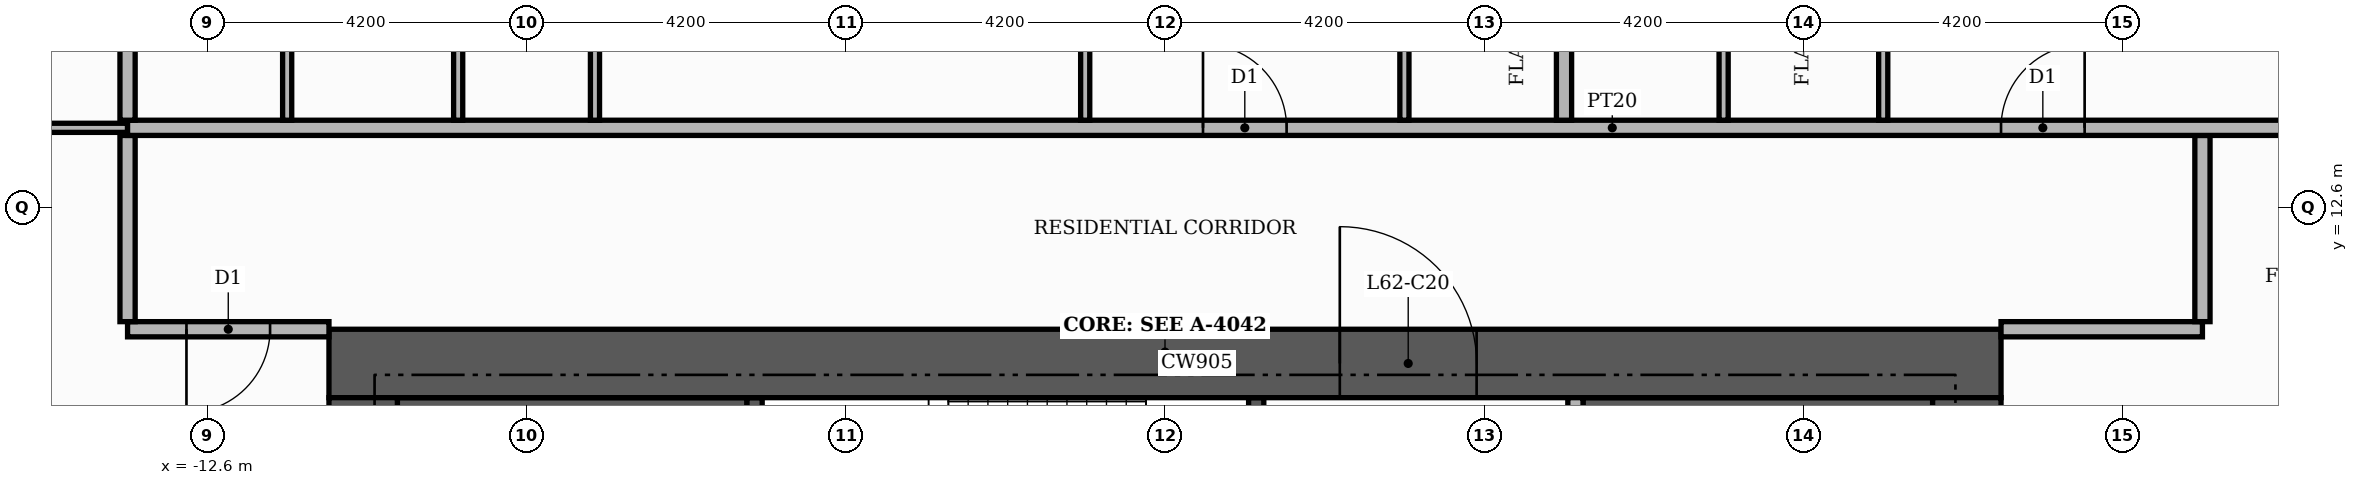
"""IFC4 building model, lengths in metres.
Left out: names, types, materials, properties, quantities, classifications, styles, units other than length and angle.
Written with IfcOpenShell. Run it as: python <this file> out.ifc"""

import sys

from ifc_helpers import new_model, si_unit, direction, frame, frame_2d, origin, place, context, subcontext, project, spatial, rectangle, extrude, element, fill, save


model = new_model("IFC4")
c1 = context("Model", 3, precision=1e-05, world=origin(), true_north=direction((0.0, 1.0)))
c2 = subcontext(c1, "Body", "Model", "MODEL_VIEW")
j1 = project(units=[si_unit("LENGTHUNIT", "METRE"), si_unit("PLANEANGLEUNIT", "RADIAN")], contexts=[c1])
p1 = place(None, origin())
s1 = spatial("IfcSite", under=j1, at=p1, CompositionType="ELEMENT")
p2 = place(p1, origin())
s2 = spatial("IfcBuilding", under=s1, at=p2, CompositionType="ELEMENT")
p3 = place(p2, frame((0.0, 0.0, 260.1)))
s3 = spatial("IfcBuildingStorey", under=s2, at=p3, CompositionType="ELEMENT", Elevation=260.1)
for number, where, z_axis, x_axis in (
    (1, (-10.1, 9.15, 0.0), (0.0, 0.0, 1.0), (1.0, 0.0, 0.0)),
    (2, (5.5, 9.15, 0.0), (0.0, 0.0, 1.0), (1.0, 0.0, 0.0)),
):
    element("IfcWall", number, at=place(p3, frame(where, z_axis=z_axis, x_axis=x_axis)), inside=s3, PredefinedType="SHEAR", context=c2, shape_type="SweptSolid", body=[
        extrude(rectangle(XDim=4.6, YDim=1.9, at=frame_2d((2.3, 0.0))), origin(), (0.0, 0.0, 1.0), 3.48),
    ])
p4 = place(p3, frame((-5.4, 7.25, 0.0), z_axis=(0.0, 0.0, 1.0), x_axis=(0.0, 1.0, 0.0)))
e3 = element("IfcWall", 3, at=p4, inside=s3, PredefinedType="SHEAR", context=c2, shape_type="SweptSolid", body=[
    extrude(rectangle(XDim=2.85, YDim=0.2, at=frame_2d((1.425, 0.0))), origin(), (0.0, 0.0, 1.0), 3.48),
])
p5 = place(p3, frame((1.2, 7.25, 0.0), z_axis=(0.0, 0.0, 1.0), x_axis=(0.0, 1.0, 0.0)))
e4 = element("IfcWall", 4, at=p5, inside=s3, PredefinedType="SHEAR", context=c2, shape_type="SweptSolid", body=[
    extrude(rectangle(XDim=2.85, YDim=0.2, at=frame_2d((1.425, 0.0))), origin(), (0.0, 0.0, 1.0), 3.48),
])
p6 = place(p5, frame((0.85, 0.0, 0.0)))
e5 = element("IfcOpeningElement", 5, at=p6, cuts=e4, PredefinedType="OPENING", context=c2, shape_type="SweptSolid", body=[
    extrude(rectangle(XDim=1.0, YDim=2.1, at=frame_2d((0.5, 1.05))), frame((0.0, 0.11, 0.0), z_axis=(0.0, -1.0, 0.0), x_axis=(1.0, 0.0, 0.0)), (0.0, 0.0, 1.0), 0.22),
])
p7 = place(p3, frame((-11.0, 10.55, 0.0), z_axis=(0.0, 0.0, 1.0), x_axis=(1.0, 0.0, 0.0)))
e6 = element("IfcWall", 6, at=p7, inside=s3, PredefinedType="SHEAR", context=c2, shape_type="SweptSolid", body=[
    extrude(rectangle(XDim=22.0, YDim=0.9, at=frame_2d((11.0, 0.0))), origin(), (0.0, 0.0, 1.0), 3.48),
])
p8 = place(p7, frame((13.3, 0.0, 0.0)))
e7 = element("IfcOpeningElement", 7, at=p8, cuts=e6, PredefinedType="OPENING", context=c2, shape_type="SweptSolid", body=[
    extrude(rectangle(XDim=1.8, YDim=2.2, at=frame_2d((0.9, 1.1))), frame((0.0, 0.46, 0.0), z_axis=(0.0, -1.0, 0.0), x_axis=(1.0, 0.0, 0.0)), (0.0, 0.0, 1.0), 0.92),
])
for number, where, z_axis, x_axis in (
    (8, (-10.55, -10.1, 0.0), (0.0, 0.0, 1.0), (0.0, 1.0, 0.0)),
    (9, (10.55, -10.1, 0.0), (0.0, 0.0, 1.0), (0.0, 1.0, 0.0)),
):
    element("IfcWall", number, at=place(p3, frame(where, z_axis=z_axis, x_axis=x_axis)), inside=s3, PredefinedType="SHEAR", context=c2, shape_type="SweptSolid", body=[
        extrude(rectangle(XDim=20.2, YDim=0.9, at=frame_2d((10.1, 0.0))), origin(), (0.0, 0.0, 1.0), 3.48),
    ])
p9 = place(p3, frame((5.4, 5.5, 0.0), z_axis=(0.0, 0.0, 1.0), x_axis=(0.0, 1.0, 0.0)))
e10 = element("IfcWall", 10, at=p9, inside=s3, PredefinedType="PARTITIONING", context=c2, shape_type="SweptSolid", body=[
    extrude(rectangle(XDim=4.6, YDim=0.2, at=frame_2d((2.3, 0.0))), origin(), (0.0, 0.0, 1.0), 3.48),
])
p10 = place(p9, frame((0.25, 0.0, 0.0)))
e11 = element("IfcOpeningElement", 11, at=p10, cuts=e10, PredefinedType="OPENING", context=c2, shape_type="SweptSolid", body=[
    extrude(rectangle(XDim=1.0, YDim=2.1, at=frame_2d((0.5, 1.05))), frame((0.0, 0.11, 0.0), z_axis=(0.0, -1.0, 0.0), x_axis=(1.0, 0.0, 0.0)), (0.0, 0.0, 1.0), 0.22),
])
p11 = place(p3, frame((-13.65, 11.0, 0.0), z_axis=(0.0, 0.0, 1.0), x_axis=(1.0, 0.0, 0.0)))
e12 = element("IfcWall", 12, at=p11, inside=s3, PredefinedType="PARTITIONING", context=c2, shape_type="SweptSolid", body=[
    extrude(rectangle(XDim=2.65, YDim=0.2, at=frame_2d((1.325, 0.0))), origin(), (0.0, 0.0, 1.0), 3.48),
])
p12 = place(p11, frame((0.775, 0.0, 0.0)))
e13 = element("IfcOpeningElement", 13, at=p12, cuts=e12, PredefinedType="OPENING", context=c2, shape_type="SweptSolid", body=[
    extrude(rectangle(XDim=1.1, YDim=2.4, at=frame_2d((0.55, 1.2))), frame((0.0, 0.11, 0.0), z_axis=(0.0, -1.0, 0.0), x_axis=(1.0, 0.0, 0.0)), (0.0, 0.0, 1.0), 0.22),
])
p13 = place(p3, frame((11.0, 11.0, 0.0), z_axis=(0.0, 0.0, 1.0), x_axis=(1.0, 0.0, 0.0)))
e14 = element("IfcWall", 14, at=p13, inside=s3, PredefinedType="PARTITIONING", context=c2, shape_type="SweptSolid", body=[
    extrude(rectangle(XDim=2.65, YDim=0.2, at=frame_2d((1.325, 0.0))), origin(), (0.0, 0.0, 1.0), 3.48),
])
for number, where, z_axis, x_axis in (
    (15, (-13.65, 11.1, 0.0), (0.0, 0.0, 1.0), (0.0, 1.0, 0.0)),
    (16, (13.65, 11.1, 0.0), (0.0, 0.0, 1.0), (0.0, 1.0, 0.0)),
):
    element("IfcWall", number, at=place(p3, frame(where, z_axis=z_axis, x_axis=x_axis)), inside=s3, PredefinedType="PARTITIONING", context=c2, shape_type="SweptSolid", body=[
        extrude(rectangle(XDim=2.45, YDim=0.2, at=frame_2d((1.225, 0.0))), origin(), (0.0, 0.0, 1.0), 3.48),
    ])
p14 = place(p3, frame((-20.72, 13.65, 0.0), z_axis=(0.0, 0.0, 1.0), x_axis=(1.0, 0.0, 0.0)))
e17 = element("IfcWall", 17, at=p14, inside=s3, PredefinedType="PARTITIONING", context=c2, shape_type="SweptSolid", body=[
    extrude(rectangle(XDim=7.07, YDim=0.12, at=frame_2d((3.535, 0.0))), origin(), (0.0, 0.0, 1.0), 3.48),
])
p15 = place(p14, frame((3.085, 0.0, 0.0)))
e18 = element("IfcOpeningElement", 18, at=p15, cuts=e17, PredefinedType="OPENING", context=c2, shape_type="SweptSolid", body=[
    extrude(rectangle(XDim=0.9, YDim=2.1, at=frame_2d((0.45, 1.05))), frame((0.0, 0.07, 0.0), z_axis=(0.0, -1.0, 0.0), x_axis=(1.0, 0.0, 0.0)), (0.0, 0.0, 1.0), 0.14),
])
p16 = place(p3, frame((-13.65, 13.65, 0.0), z_axis=(0.0, 0.0, 1.0), x_axis=(1.0, 0.0, 0.0)))
e19 = element("IfcWall", 19, at=p16, inside=s3, PredefinedType="PARTITIONING", context=c2, shape_type="SweptSolid", body=[
    extrude(rectangle(XDim=39.07, YDim=0.2, at=frame_2d((19.535, 0.0))), origin(), (0.0, 0.0, 1.0), 3.48),
])
p17 = place(p16, frame((24.65, 0.0, 0.0)))
e20 = element("IfcOpeningElement", 20, at=p17, cuts=e19, PredefinedType="OPENING", context=c2, shape_type="SweptSolid", body=[
    extrude(rectangle(XDim=1.1, YDim=2.4, at=frame_2d((0.55, 1.2))), frame((0.0, 0.11, 0.0), z_axis=(0.0, -1.0, 0.0), x_axis=(1.0, 0.0, 0.0)), (0.0, 0.0, 1.0), 0.22),
])
p18 = place(p16, frame((14.15, 0.0, 0.0)))
e21 = element("IfcOpeningElement", 21, at=p18, cuts=e19, PredefinedType="OPENING", context=c2, shape_type="SweptSolid", body=[
    extrude(rectangle(XDim=1.1, YDim=2.4, at=frame_2d((0.55, 1.2))), frame((0.0, 0.11, 0.0), z_axis=(0.0, -1.0, 0.0), x_axis=(1.0, 0.0, 0.0)), (0.0, 0.0, 1.0), 0.22),
])
p19 = place(p3, frame((-13.65, 13.75, 0.0), z_axis=(0.0, 0.0, 1.0), x_axis=(0.0, 1.0, 0.0)))
e22 = element("IfcWall", 22, at=p19, inside=s3, PredefinedType="PARTITIONING", context=c2, shape_type="SweptSolid", body=[
    extrude(rectangle(XDim=11.67, YDim=0.2, at=frame_2d((5.835, 0.0))), origin(), (0.0, 0.0, 1.0), 3.48),
])
for number, where, z_axis, x_axis in (
    (23, (-11.55, 13.75, 0.0), (0.0, 0.0, 1.0), (0.0, 1.0, 0.0)),
    (24, (-9.3, 13.75, 0.0), (0.0, 0.0, 1.0), (0.0, 1.0, 0.0)),
    (25, (-7.5, 13.75, 0.0), (0.0, 0.0, 1.0), (0.0, 1.0, 0.0)),
    (26, (-1.05, 13.75, 0.0), (0.0, 0.0, 1.0), (0.0, 1.0, 0.0)),
):
    element("IfcWall", number, at=place(p3, frame(where, z_axis=z_axis, x_axis=x_axis)), inside=s3, PredefinedType="PARTITIONING", context=c2, shape_type="SweptSolid", body=[
        extrude(rectangle(XDim=4.51, YDim=0.12, at=frame_2d((2.255, 0.0))), origin(), (0.0, 0.0, 1.0), 3.48),
    ])
p20 = place(p3, frame((3.15, 13.75, 0.0), z_axis=(0.0, 0.0, 1.0), x_axis=(0.0, 1.0, 0.0)))
e27 = element("IfcWall", 27, at=p20, inside=s3, PredefinedType="PARTITIONING", context=c2, shape_type="SweptSolid", body=[
    extrude(rectangle(XDim=4.51, YDim=0.12, at=frame_2d((2.255, 0.0))), origin(), (0.0, 0.0, 1.0), 3.48),
])
p21 = place(p20, frame((1.785, 0.0, 0.0)))
e28 = element("IfcOpeningElement", 28, at=p21, cuts=e27, PredefinedType="OPENING", context=c2, shape_type="SweptSolid", body=[
    extrude(rectangle(XDim=0.9, YDim=2.1, at=frame_2d((0.45, 1.05))), frame((0.0, 0.07, 0.0), z_axis=(0.0, -1.0, 0.0), x_axis=(1.0, 0.0, 0.0)), (0.0, 0.0, 1.0), 0.14),
])
p22 = place(p3, frame((5.25, 13.75, 0.0), z_axis=(0.0, 0.0, 1.0), x_axis=(0.0, 1.0, 0.0)))
e29 = element("IfcWall", 29, at=p22, inside=s3, PredefinedType="PARTITIONING", context=c2, shape_type="SweptSolid", body=[
    extrude(rectangle(XDim=11.67, YDim=0.2, at=frame_2d((5.835, 0.0))), origin(), (0.0, 0.0, 1.0), 3.48),
])
p23 = place(p3, frame((7.35, 13.75, 0.0), z_axis=(0.0, 0.0, 1.0), x_axis=(0.0, 1.0, 0.0)))
e30 = element("IfcWall", 30, at=p23, inside=s3, PredefinedType="PARTITIONING", context=c2, shape_type="SweptSolid", body=[
    extrude(rectangle(XDim=5.11, YDim=0.12, at=frame_2d((2.555, 0.0))), origin(), (0.0, 0.0, 1.0), 3.48),
])
p24 = place(p3, frame((9.45, 13.75, 0.0), z_axis=(0.0, 0.0, 1.0), x_axis=(0.0, 1.0, 0.0)))
e31 = element("IfcWall", 31, at=p24, inside=s3, PredefinedType="PARTITIONING", context=c2, shape_type="SweptSolid", body=[
    extrude(rectangle(XDim=5.11, YDim=0.12, at=frame_2d((2.555, 0.0))), origin(), (0.0, 0.0, 1.0), 3.48),
])
p25 = place(p24, frame((2.085, 0.0, 0.0)))
e32 = element("IfcOpeningElement", 32, at=p25, cuts=e31, PredefinedType="OPENING", context=c2, shape_type="SweptSolid", body=[
    extrude(rectangle(XDim=0.9, YDim=2.1, at=frame_2d((0.45, 1.05))), frame((0.0, 0.07, 0.0), z_axis=(0.0, -1.0, 0.0), x_axis=(1.0, 0.0, 0.0)), (0.0, 0.0, 1.0), 0.14),
])
p26 = place(p8, origin())
e33 = element("IfcDoor", 33, at=p26, inside=s3, OperationType="DOUBLE_DOOR_SINGLE_SWING", PredefinedType="DOOR", context=c2, shape_type="SweptSolid", body=[
    extrude(rectangle(XDim=1.8, YDim=2.2, at=frame_2d((0.9, 1.1))), frame((0.0, 0.025, 0.0), z_axis=(0.0, -1.0, 0.0), x_axis=(1.0, 0.0, 0.0)), (0.0, 0.0, 1.0), 0.05),
])
fill(e7, e33)
p27 = place(p17, origin())
e34 = element("IfcDoor", 34, at=p27, inside=s3, OperationType="SINGLE_SWING_RIGHT", PredefinedType="DOOR", context=c2, shape_type="SweptSolid", body=[
    extrude(rectangle(XDim=1.1, YDim=2.4, at=frame_2d((0.55, 1.2))), frame((0.0, 0.025, 0.0), z_axis=(0.0, -1.0, 0.0), x_axis=(1.0, 0.0, 0.0)), (0.0, 0.0, 1.0), 0.05),
])
fill(e20, e34)
p28 = place(p18, origin())
e35 = element("IfcDoor", 35, at=p28, inside=s3, OperationType="SINGLE_SWING_LEFT", PredefinedType="DOOR", context=c2, shape_type="SweptSolid", body=[
    extrude(rectangle(XDim=1.1, YDim=2.4, at=frame_2d((0.55, 1.2))), frame((0.0, 0.025, 0.0), z_axis=(0.0, -1.0, 0.0), x_axis=(1.0, 0.0, 0.0)), (0.0, 0.0, 1.0), 0.05),
])
fill(e21, e35)
p29 = place(p12, frame((1.1, 0.0, 0.0), z_axis=(0.0, 0.0, 1.0), x_axis=(-1.0, 0.0, 0.0)))
e36 = element("IfcDoor", 36, at=p29, inside=s3, OperationType="SINGLE_SWING_LEFT", PredefinedType="DOOR", context=c2, shape_type="SweptSolid", body=[
    extrude(rectangle(XDim=1.1, YDim=2.4, at=frame_2d((0.55, 1.2))), frame((0.0, 0.025, 0.0), z_axis=(0.0, -1.0, 0.0), x_axis=(1.0, 0.0, 0.0)), (0.0, 0.0, 1.0), 0.05),
])
fill(e13, e36)
save(model, sys.argv[1])
